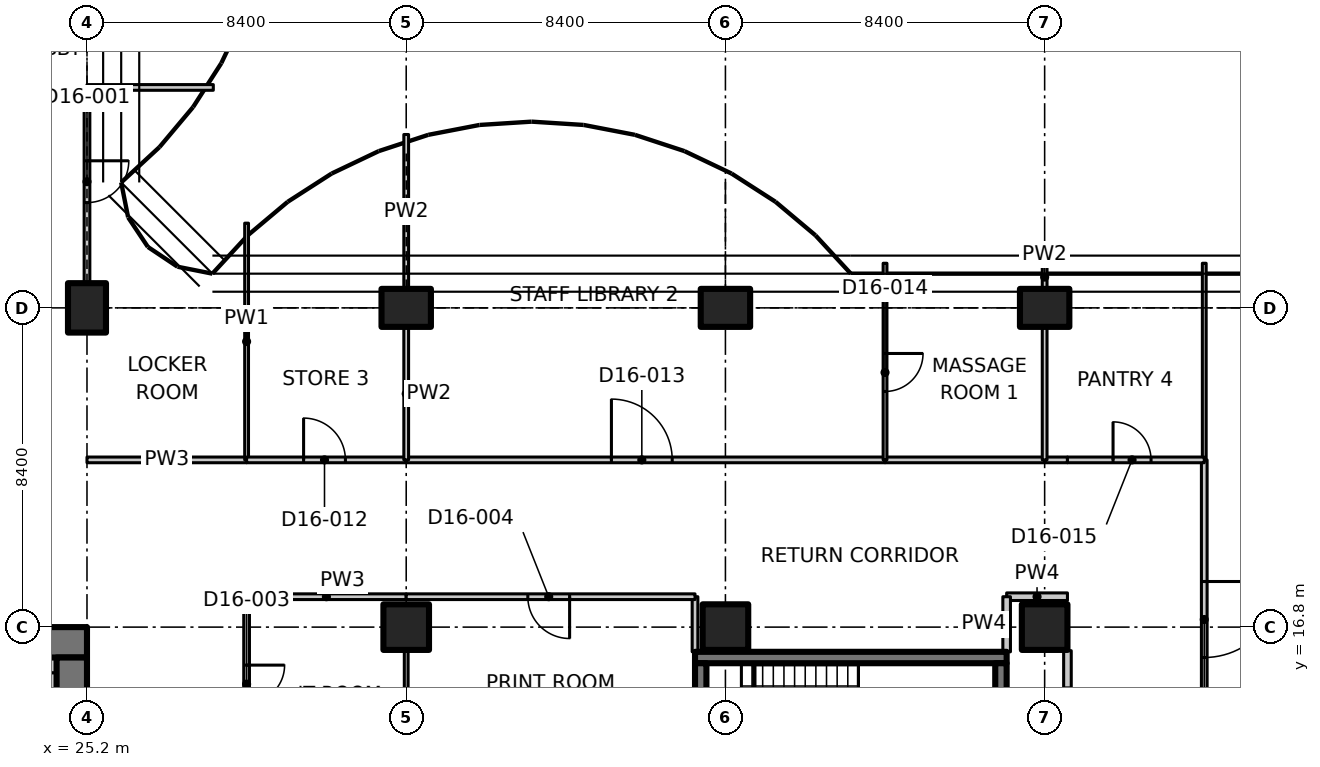
"""IFC4 building model, lengths in metres.
Left out: names, types, materials, properties, quantities, classifications, styles, units other than length and angle.
Written with IfcOpenShell. Run it as: python <this file> out.ifc"""

import sys

from ifc_helpers import new_model, si_unit, direction, frame, frame_2d, origin, origin_2d, place, context, subcontext, project, spatial, polyline, rectangle, outline, extrude, element, fill, save


model = new_model("IFC4")
c1 = context("Model", 3, precision=1e-05, world=origin(), true_north=direction((0.0, 1.0)))
c2 = subcontext(c1, "Body", "Model", "MODEL_VIEW")
j1 = project(units=[si_unit("LENGTHUNIT", "METRE"), si_unit("PLANEANGLEUNIT", "RADIAN")], contexts=[c1])
p1 = place(None, origin())
s1 = spatial("IfcSite", under=j1, at=p1, CompositionType="ELEMENT")
p2 = place(p1, origin())
s2 = spatial("IfcBuilding", under=s1, at=p2, CompositionType="ELEMENT")
p3 = place(p2, frame((0.0, 0.0, 131.3)))
s3 = spatial("IfcBuildingStorey", under=s2, at=p3, CompositionType="ELEMENT", Elevation=131.3)
p4 = place(p3, frame((25.2, 25.2, 0.0), z_axis=(0.0, 0.0, 1.0), x_axis=(1.0, 0.0, 0.0)))
e1 = element("IfcColumn", 1, at=p4, inside=s3, PredefinedType="COLUMN", context=c2, shape_type="SweptSolid", body=[
    extrude(rectangle(XDim=1.0, YDim=1.3, at=origin_2d()), origin(), (0.0, 0.0, 1.0), 3.35),
])
p5 = place(p3, frame((33.6, 16.8, 0.0), z_axis=(0.0, 0.0, 1.0), x_axis=(1.0, 0.0, 0.0)))
e2 = element("IfcColumn", 2, at=p5, inside=s3, PredefinedType="COLUMN", context=c2, shape_type="SweptSolid", body=[
    extrude(rectangle(XDim=1.2, YDim=1.2, at=origin_2d()), origin(), (0.0, 0.0, 1.0), 3.35),
])
p6 = place(p3, frame((33.6, 25.2, 0.0), z_axis=(0.0, 0.0, 1.0), x_axis=(0.0, 1.0, 0.0)))
e3 = element("IfcColumn", 3, at=p6, inside=s3, PredefinedType="COLUMN", context=c2, shape_type="SweptSolid", body=[
    extrude(rectangle(XDim=1.0, YDim=1.3, at=origin_2d()), origin(), (0.0, 0.0, 1.0), 3.35),
])
p7 = place(p3, frame((42.0, 16.8, 0.0), z_axis=(0.0, 0.0, 1.0), x_axis=(1.0, 0.0, 0.0)))
e4 = element("IfcColumn", 4, at=p7, inside=s3, PredefinedType="COLUMN", context=c2, shape_type="SweptSolid", body=[
    extrude(rectangle(XDim=1.2, YDim=1.2, at=origin_2d()), origin(), (0.0, 0.0, 1.0), 3.35),
])
p8 = place(p3, frame((42.0, 25.2, 0.0), z_axis=(0.0, 0.0, 1.0), x_axis=(0.0, 1.0, 0.0)))
e5 = element("IfcColumn", 5, at=p8, inside=s3, PredefinedType="COLUMN", context=c2, shape_type="SweptSolid", body=[
    extrude(rectangle(XDim=1.0, YDim=1.3, at=origin_2d()), origin(), (0.0, 0.0, 1.0), 3.35),
])
p9 = place(p3, frame((50.4, 16.8, 0.0), z_axis=(0.0, 0.0, 1.0), x_axis=(1.0, 0.0, 0.0)))
e6 = element("IfcColumn", 6, at=p9, inside=s3, PredefinedType="COLUMN", context=c2, shape_type="SweptSolid", body=[
    extrude(rectangle(XDim=1.2, YDim=1.2, at=origin_2d()), origin(), (0.0, 0.0, 1.0), 3.35),
])
p10 = place(p3, frame((50.4, 25.2, 0.0), z_axis=(0.0, 0.0, 1.0), x_axis=(0.0, 1.0, 0.0)))
e7 = element("IfcColumn", 7, at=p10, inside=s3, PredefinedType="COLUMN", context=c2, shape_type="SweptSolid", body=[
    extrude(rectangle(XDim=1.0, YDim=1.3, at=origin_2d()), origin(), (0.0, 0.0, 1.0), 3.35),
])
p11 = place(p3, frame((23.8, 16.4, 0.0), z_axis=(0.0, 0.0, 1.0), x_axis=(1.0, 0.0, 0.0)))
e8 = element("IfcWall", 8, at=p11, inside=s3, PredefinedType="SHEAR", context=c2, shape_type="SweptSolid", body=[
    extrude(rectangle(XDim=1.4, YDim=0.8, at=frame_2d((0.7, 0.0))), origin(), (0.0, 0.0, 1.0), 3.35),
])
p12 = place(p3, frame((24.8, 12.6, 0.0), z_axis=(0.0, 0.0, 1.0), x_axis=(0.0, 1.0, 0.0)))
e9 = element("IfcWall", 9, at=p12, inside=s3, PredefinedType="SHEAR", context=c2, shape_type="SweptSolid", body=[
    extrude(rectangle(XDim=3.4, YDim=0.8, at=frame_2d((1.7, 0.0))), origin(), (0.0, 0.0, 1.0), 3.35),
])
p13 = place(p3, frame((24.2, 12.6, 0.0), z_axis=(0.0, 0.0, 1.0), x_axis=(0.0, 1.0, 0.0)))
e10 = element("IfcWall", 10, at=p13, inside=s3, PredefinedType="PARTITIONING", context=c2, shape_type="SweptSolid", body=[
    extrude(rectangle(XDim=3.0, YDim=0.4, at=frame_2d((1.5, 0.0))), origin(), (0.0, 0.0, 1.0), 3.35),
])
p14 = place(p3, frame((23.8, 15.8, 0.0), z_axis=(0.0, 0.0, 1.0), x_axis=(1.0, 0.0, 0.0)))
e11 = element("IfcWall", 11, at=p14, inside=s3, PredefinedType="PARTITIONING", context=c2, shape_type="SweptSolid", body=[
    extrude(rectangle(XDim=0.6, YDim=0.4, at=frame_2d((0.3, 0.0))), origin(), (0.0, 0.0, 1.0), 3.35),
])
p15 = place(p3, frame((41.2, 16.0, 0.0), z_axis=(0.0, 0.0, 1.0), x_axis=(1.0, 0.0, 0.0)))
e12 = element("IfcWall", 12, at=p15, inside=s3, PredefinedType="SHEAR", context=c2, shape_type="SweptSolid", body=[
    extrude(rectangle(XDim=8.2, YDim=0.3, at=frame_2d((4.1, 0.0))), origin(), (0.0, 0.0, 1.0), 3.35),
])
for number, where, z_axis, x_axis in (
    (13, (41.35, 13.3, 0.0), (0.0, 0.0, 1.0), (0.0, 1.0, 0.0)),
    (14, (49.25, 13.3, 0.0), (0.0, 0.0, 1.0), (0.0, 1.0, 0.0)),
):
    element("IfcWall", number, at=place(p3, frame(where, z_axis=z_axis, x_axis=x_axis)), inside=s3, PredefinedType="SHEAR", context=c2, shape_type="SweptSolid", body=[
        extrude(rectangle(XDim=2.55, YDim=0.3, at=frame_2d((1.275, 0.0))), origin(), (0.0, 0.0, 1.0), 3.35),
    ])
p16 = place(p3, frame((25.2, 21.2, 0.0), z_axis=(0.0, 0.0, 1.0), x_axis=(1.0, 0.0, 0.0)))
e15 = element("IfcWall", 15, at=p16, inside=s3, PredefinedType="PARTITIONING", context=c2, shape_type="SweptSolid", body=[
    extrude(rectangle(XDim=4.2, YDim=0.15, at=frame_2d((2.1, 0.0))), origin(), (0.0, 0.0, 1.0), 3.33),
])
p17 = place(p3, frame((29.4, 17.6, 0.0), z_axis=(0.0, 0.0, 1.0), x_axis=(0.0, -1.0, 0.0)))
e16 = element("IfcWall", 16, at=p17, inside=s3, PredefinedType="PARTITIONING", context=c2, shape_type="SweptSolid", body=[
    extrude(rectangle(XDim=4.6, YDim=0.15, at=frame_2d((2.3, 0.0))), origin(), (0.0, 0.0, 1.0), 3.33),
])
p18 = place(p17, frame((1.8, 0.0, 0.0)))
e17 = element("IfcOpeningElement", 17, at=p18, cuts=e16, PredefinedType="OPENING", context=c2, shape_type="SweptSolid", body=[
    extrude(rectangle(XDim=1.0, YDim=2.1, at=frame_2d((0.5, 1.05))), frame((0.0, 0.085, 0.0), z_axis=(0.0, -1.0, 0.0), x_axis=(1.0, 0.0, 0.0)), (0.0, 0.0, 1.0), 0.17),
])
p19 = place(p3, frame((29.4, 27.429, 0.0), z_axis=(0.0, 0.0, 1.0), x_axis=(0.0, -1.0, 0.0)))
e18 = element("IfcWall", 18, at=p19, inside=s3, PredefinedType="PARTITIONING", context=c2, shape_type="SweptSolid", body=[
    extrude(outline(polyline([(0.0, 0.0), (6.229, 0.0), (6.229, 3.33), (2.679, 3.33), (2.677, 2.98), (1.781, 2.98), (1.779, 3.33), (0.154, 3.33), (0.0, 3.33), (0.0, 0.0)])), frame((0.0, 0.05, 0.0), z_axis=(0.0, -1.0, 0.0), x_axis=(1.0, 0.0, 0.0)), (0.0, 0.0, 1.0), 0.1),
])
p20 = place(p3, frame((25.2, 31.0, 0.0), z_axis=(0.0, 0.0, 1.0), x_axis=(0.0, -1.0, 0.0)))
e19 = element("IfcWall", 19, at=p20, inside=s3, PredefinedType="PARTITIONING", context=c2, shape_type="SweptSolid", body=[
    extrude(outline(polyline([(0.0, 0.0), (5.13, 0.0), (5.13, 2.98), (0.0, 2.98), (0.0, 0.0)])), frame((0.0, 0.075, 0.0), z_axis=(0.0, -1.0, 0.0), x_axis=(1.0, 0.0, 0.0)), (0.0, 0.0, 1.0), 0.15),
])
p21 = place(p20, frame((1.93, 0.0, 0.0)))
e20 = element("IfcOpeningElement", 20, at=p21, cuts=e19, PredefinedType="OPENING", context=c2, shape_type="SweptSolid", body=[
    extrude(rectangle(XDim=1.1, YDim=2.1, at=frame_2d((0.55, 1.05))), frame((0.0, 0.085, 0.0), z_axis=(0.0, -1.0, 0.0), x_axis=(1.0, 0.0, 0.0)), (0.0, 0.0, 1.0), 0.17),
])
p22 = place(p3, frame((25.2, 31.0, 0.0), z_axis=(0.0, 0.0, 1.0), x_axis=(1.0, 0.0, 0.0)))
e21 = element("IfcWall", 21, at=p22, inside=s3, PredefinedType="PARTITIONING", context=c2, shape_type="SweptSolid", body=[
    extrude(rectangle(XDim=3.324, YDim=0.15, at=frame_2d((1.662, 0.0))), origin(), (0.0, 0.0, 1.0), 2.98),
])
p23 = place(p3, frame((54.6, 21.2, 0.0), z_axis=(0.0, 0.0, 1.0), x_axis=(0.0, -1.0, 0.0)))
e22 = element("IfcWall", 22, at=p23, inside=s3, PredefinedType="PARTITIONING", context=c2, shape_type="SweptSolid", body=[
    extrude(rectangle(XDim=8.2, YDim=0.15, at=frame_2d((4.1, 0.0))), origin(), (0.0, 0.0, 1.0), 3.33),
])
p24 = place(p23, frame((3.2, 0.0, 0.0)))
e23 = element("IfcOpeningElement", 23, at=p24, cuts=e22, PredefinedType="OPENING", context=c2, shape_type="SweptSolid", body=[
    extrude(rectangle(XDim=2.0, YDim=2.4, at=frame_2d((1.0, 1.2))), frame((0.0, 0.085, 0.0), z_axis=(0.0, -1.0, 0.0), x_axis=(1.0, 0.0, 0.0)), (0.0, 0.0, 1.0), 0.17),
])
p25 = place(p3, frame((54.6, 21.2, 0.0), z_axis=(0.0, 0.0, 1.0), x_axis=(0.0, 1.0, 0.0)))
e24 = element("IfcWall", 24, at=p25, inside=s3, PredefinedType="PARTITIONING", context=c2, shape_type="SweptSolid", body=[
    extrude(outline(polyline([(0.0, 0.0), (5.174, 0.0), (5.174, 3.33), (5.1, 3.33), (4.45, 3.33), (4.448, 2.98), (3.552, 2.98), (3.55, 3.33), (0.0, 3.33), (0.0, 0.0)])), frame((0.0, 0.05, 0.0), z_axis=(0.0, -1.0, 0.0), x_axis=(1.0, 0.0, 0.0)), (0.0, 0.0, 1.0), 0.1),
])
p26 = place(p3, frame((33.6, 17.6, 0.0), z_axis=(0.0, 0.0, 1.0), x_axis=(-1.0, 0.0, 0.0)))
e25 = element("IfcWall", 25, at=p26, inside=s3, PredefinedType="PARTITIONING", context=c2, shape_type="SweptSolid", body=[
    extrude(rectangle(XDim=4.2, YDim=0.15, at=frame_2d((2.1, 0.0))), origin(), (0.0, 0.0, 1.0), 3.33),
])
p27 = place(p3, frame((41.2, 16.15, 0.0), z_axis=(0.0, 0.0, 1.0), x_axis=(0.0, 1.0, 0.0)))
e26 = element("IfcWall", 26, at=p27, inside=s3, PredefinedType="PARTITIONING", context=c2, shape_type="SweptSolid", body=[
    extrude(rectangle(XDim=1.45, YDim=0.15, at=frame_2d((0.725, 0.0))), origin(), (0.0, 0.0, 1.0), 3.33),
])
p28 = place(p3, frame((41.2, 17.6, 0.0), z_axis=(0.0, 0.0, 1.0), x_axis=(-1.0, 0.0, 0.0)))
e27 = element("IfcWall", 27, at=p28, inside=s3, PredefinedType="PARTITIONING", context=c2, shape_type="SweptSolid", body=[
    extrude(rectangle(XDim=7.6, YDim=0.15, at=frame_2d((3.8, 0.0))), origin(), (0.0, 0.0, 1.0), 3.33),
])
p29 = place(p28, frame((3.3, 0.0, 0.0)))
e28 = element("IfcOpeningElement", 28, at=p29, cuts=e27, PredefinedType="OPENING", context=c2, shape_type="SweptSolid", body=[
    extrude(rectangle(XDim=1.1, YDim=2.1, at=frame_2d((0.55, 1.05))), frame((0.0, 0.085, 0.0), z_axis=(0.0, -1.0, 0.0), x_axis=(1.0, 0.0, 0.0)), (0.0, 0.0, 1.0), 0.17),
])
p30 = place(p3, frame((51.0, 17.6, 0.0), z_axis=(0.0, 0.0, 1.0), x_axis=(-1.0, 0.0, 0.0)))
e29 = element("IfcWall", 29, at=p30, inside=s3, PredefinedType="PARTITIONING", context=c2, shape_type="SweptSolid", body=[
    extrude(rectangle(XDim=1.6, YDim=0.2, at=frame_2d((0.8, 0.0))), origin(), (0.0, 0.0, 1.0), 3.33),
])
p31 = place(p3, frame((49.4, 17.6, 0.0), z_axis=(0.0, 0.0, 1.0), x_axis=(0.0, -1.0, 0.0)))
e30 = element("IfcWall", 30, at=p31, inside=s3, PredefinedType="PARTITIONING", context=c2, shape_type="SweptSolid", body=[
    extrude(rectangle(XDim=1.45, YDim=0.2, at=frame_2d((0.725, 0.0))), origin(), (0.0, 0.0, 1.0), 3.33),
])
p32 = place(p3, frame((29.4, 21.2, 0.0), z_axis=(0.0, 0.0, 1.0), x_axis=(1.0, 0.0, 0.0)))
e31 = element("IfcWall", 31, at=p32, inside=s3, PredefinedType="PARTITIONING", context=c2, shape_type="SweptSolid", body=[
    extrude(rectangle(XDim=4.2, YDim=0.15, at=frame_2d((2.1, 0.0))), origin(), (0.0, 0.0, 1.0), 3.33),
])
p33 = place(p32, frame((1.5, 0.0, 0.0)))
e32 = element("IfcOpeningElement", 32, at=p33, cuts=e31, PredefinedType="OPENING", context=c2, shape_type="SweptSolid", body=[
    extrude(rectangle(XDim=1.1, YDim=2.1, at=frame_2d((0.55, 1.05))), frame((0.0, 0.085, 0.0), z_axis=(0.0, -1.0, 0.0), x_axis=(1.0, 0.0, 0.0)), (0.0, 0.0, 1.0), 0.17),
])
p34 = place(p3, frame((33.6, 21.2, 0.0), z_axis=(0.0, 0.0, 1.0), x_axis=(1.0, 0.0, 0.0)))
e33 = element("IfcWall", 33, at=p34, inside=s3, PredefinedType="PARTITIONING", context=c2, shape_type="SweptSolid", body=[
    extrude(rectangle(XDim=12.6, YDim=0.15, at=frame_2d((6.3, 0.0))), origin(), (0.0, 0.0, 1.0), 3.33),
])
p35 = place(p34, frame((5.4, 0.0, 0.0)))
e34 = element("IfcOpeningElement", 34, at=p35, cuts=e33, PredefinedType="OPENING", context=c2, shape_type="SweptSolid", body=[
    extrude(rectangle(XDim=1.6, YDim=2.1, at=frame_2d((0.8, 1.05))), frame((0.0, 0.085, 0.0), z_axis=(0.0, -1.0, 0.0), x_axis=(1.0, 0.0, 0.0)), (0.0, 0.0, 1.0), 0.17),
])
p36 = place(p3, frame((46.2, 21.2, 0.0), z_axis=(0.0, 0.0, 1.0), x_axis=(1.0, 0.0, 0.0)))
e35 = element("IfcWall", 35, at=p36, inside=s3, PredefinedType="PARTITIONING", context=c2, shape_type="SweptSolid", body=[
    extrude(rectangle(XDim=4.2, YDim=0.15, at=frame_2d((2.1, 0.0))), origin(), (0.0, 0.0, 1.0), 3.33),
])
p37 = place(p3, frame((50.4, 21.2, 0.0), z_axis=(0.0, 0.0, 1.0), x_axis=(1.0, 0.0, 0.0)))
e36 = element("IfcWall", 36, at=p37, inside=s3, PredefinedType="PARTITIONING", context=c2, shape_type="SweptSolid", body=[
    extrude(rectangle(XDim=0.6, YDim=0.15, at=frame_2d((0.3, 0.0))), origin(), (0.0, 0.0, 1.0), 3.33),
])
p38 = place(p3, frame((51.0, 13.0, 0.0), z_axis=(0.0, 0.0, 1.0), x_axis=(0.0, 1.0, 0.0)))
e37 = element("IfcWall", 37, at=p38, inside=s3, PredefinedType="PARTITIONING", context=c2, shape_type="SweptSolid", body=[
    extrude(rectangle(XDim=3.18, YDim=0.2, at=frame_2d((1.59, 0.0))), origin(), (0.0, 0.0, 1.0), 3.33),
])
p39 = place(p38, frame((1.2, 0.0, 0.0)))
e38 = element("IfcOpeningElement", 38, at=p39, cuts=e37, PredefinedType="OPENING", context=c2, shape_type="SweptSolid", body=[
    extrude(rectangle(XDim=1.0, YDim=2.1, at=frame_2d((0.5, 1.05))), frame((0.0, 0.11, 0.0), z_axis=(0.0, -1.0, 0.0), x_axis=(1.0, 0.0, 0.0)), (0.0, 0.0, 1.0), 0.22),
])
p40 = place(p3, frame((51.0, 21.2, 0.0), z_axis=(0.0, 0.0, 1.0), x_axis=(1.0, 0.0, 0.0)))
e39 = element("IfcWall", 39, at=p40, inside=s3, PredefinedType="PARTITIONING", context=c2, shape_type="SweptSolid", body=[
    extrude(rectangle(XDim=3.6, YDim=0.15, at=frame_2d((1.8, 0.0))), origin(), (0.0, 0.0, 1.0), 3.33),
])
p41 = place(p40, frame((1.2, 0.0, 0.0)))
e40 = element("IfcOpeningElement", 40, at=p41, cuts=e39, PredefinedType="OPENING", context=c2, shape_type="SweptSolid", body=[
    extrude(rectangle(XDim=1.0, YDim=2.1, at=frame_2d((0.5, 1.05))), frame((0.0, 0.085, 0.0), z_axis=(0.0, -1.0, 0.0), x_axis=(1.0, 0.0, 0.0)), (0.0, 0.0, 1.0), 0.17),
])
p42 = place(p3, frame((33.6, 16.18, 0.0), z_axis=(0.0, 0.0, 1.0), x_axis=(0.0, -1.0, 0.0)))
e41 = element("IfcWall", 41, at=p42, inside=s3, PredefinedType="PARTITIONING", context=c2, shape_type="SweptSolid", body=[
    extrude(rectangle(XDim=3.18, YDim=0.1, at=frame_2d((1.59, 0.0))), origin(), (0.0, 0.0, 1.0), 3.33),
])
p43 = place(p3, frame((33.6, 29.762, 0.0), z_axis=(0.0, 0.0, 1.0), x_axis=(0.0, -1.0, 0.0)))
e42 = element("IfcWall", 42, at=p43, inside=s3, PredefinedType="PARTITIONING", context=c2, shape_type="SweptSolid", body=[
    extrude(rectangle(XDim=4.042, YDim=0.125, at=frame_2d((2.021, 0.0))), origin(), (0.0, 0.0, 1.0), 2.98),
])
p44 = place(p3, frame((33.6, 24.68, 0.0), z_axis=(0.0, 0.0, 1.0), x_axis=(0.0, -1.0, 0.0)))
e43 = element("IfcWall", 43, at=p44, inside=s3, PredefinedType="PARTITIONING", context=c2, shape_type="SweptSolid", body=[
    extrude(rectangle(XDim=3.48, YDim=0.125, at=frame_2d((1.74, 0.0))), origin(), (0.0, 0.0, 1.0), 3.33),
])
p45 = place(p3, frame((46.2, 26.374, 0.0), z_axis=(0.0, 0.0, 1.0), x_axis=(0.0, -1.0, 0.0)))
e44 = element("IfcWall", 44, at=p45, inside=s3, PredefinedType="PARTITIONING", context=c2, shape_type="SweptSolid", body=[
    extrude(outline(polyline([(0.0, 0.0), (5.174, 0.0), (5.174, 3.33), (1.624, 3.33), (1.622, 2.98), (0.726, 2.98), (0.724, 3.33), (0.074, 3.33), (0.0, 3.33), (0.0, 0.0)])), frame((0.0, 0.05, 0.0), z_axis=(0.0, -1.0, 0.0), x_axis=(1.0, 0.0, 0.0)), (0.0, 0.0, 1.0), 0.1),
])
p46 = place(p45, frame((2.374, 0.0, 0.0)))
e45 = element("IfcOpeningElement", 45, at=p46, cuts=e44, PredefinedType="OPENING", context=c2, shape_type="SweptSolid", body=[
    extrude(rectangle(XDim=1.0, YDim=2.1, at=frame_2d((0.5, 1.05))), frame((0.0, 0.06, 0.0), z_axis=(0.0, -1.0, 0.0), x_axis=(1.0, 0.0, 0.0)), (0.0, 0.0, 1.0), 0.12),
])
p47 = place(p3, frame((50.4, 26.3, 0.0), z_axis=(0.0, 0.0, 1.0), x_axis=(0.0, -1.0, 0.0)))
e46 = element("IfcWall", 46, at=p47, inside=s3, PredefinedType="PARTITIONING", context=c2, shape_type="SweptSolid", body=[
    extrude(rectangle(XDim=0.58, YDim=0.125, at=frame_2d((0.29, 0.0))), origin(), (0.0, 0.0, 1.0), 3.33),
])
p48 = place(p3, frame((50.4, 24.68, 0.0), z_axis=(0.0, 0.0, 1.0), x_axis=(0.0, -1.0, 0.0)))
e47 = element("IfcWall", 47, at=p48, inside=s3, PredefinedType="PARTITIONING", context=c2, shape_type="SweptSolid", body=[
    extrude(rectangle(XDim=3.48, YDim=0.125, at=frame_2d((1.74, 0.0))), origin(), (0.0, 0.0, 1.0), 3.33),
])
p49 = place(p21, origin())
e48 = element("IfcDoor", 48, at=p49, inside=s3, OperationType="SINGLE_SWING_RIGHT", PredefinedType="DOOR", context=c2, shape_type="SweptSolid", body=[
    extrude(rectangle(XDim=1.1, YDim=2.1, at=frame_2d((0.55, 1.05))), frame((0.0, 0.025, 0.0), z_axis=(0.0, -1.0, 0.0), x_axis=(1.0, 0.0, 0.0)), (0.0, 0.0, 1.0), 0.05),
])
fill(e20, e48)
p50 = place(p24, origin())
e49 = element("IfcDoor", 49, at=p50, inside=s3, OperationType="DOUBLE_DOOR_SINGLE_SWING", PredefinedType="DOOR", context=c2, shape_type="SweptSolid", body=[
    extrude(rectangle(XDim=2.0, YDim=2.4, at=frame_2d((1.0, 1.2))), frame((0.0, 0.025, 0.0), z_axis=(0.0, -1.0, 0.0), x_axis=(1.0, 0.0, 0.0)), (0.0, 0.0, 1.0), 0.05),
])
fill(e23, e49)
p51 = place(p18, origin())
e50 = element("IfcDoor", 50, at=p51, inside=s3, OperationType="SINGLE_SWING_LEFT", PredefinedType="DOOR", context=c2, shape_type="SweptSolid", body=[
    extrude(rectangle(XDim=1.0, YDim=2.1, at=frame_2d((0.5, 1.05))), frame((0.0, 0.025, 0.0), z_axis=(0.0, -1.0, 0.0), x_axis=(1.0, 0.0, 0.0)), (0.0, 0.0, 1.0), 0.05),
])
fill(e17, e50)
p52 = place(p29, origin())
e51 = element("IfcDoor", 51, at=p52, inside=s3, OperationType="SINGLE_SWING_LEFT", PredefinedType="DOOR", context=c2, shape_type="SweptSolid", body=[
    extrude(rectangle(XDim=1.1, YDim=2.1, at=frame_2d((0.55, 1.05))), frame((0.0, 0.025, 0.0), z_axis=(0.0, -1.0, 0.0), x_axis=(1.0, 0.0, 0.0)), (0.0, 0.0, 1.0), 0.05),
])
fill(e28, e51)
p53 = place(p33, origin())
e52 = element("IfcDoor", 52, at=p53, inside=s3, OperationType="SINGLE_SWING_LEFT", PredefinedType="DOOR", context=c2, shape_type="SweptSolid", body=[
    extrude(rectangle(XDim=1.1, YDim=2.1, at=frame_2d((0.55, 1.05))), frame((0.0, 0.025, 0.0), z_axis=(0.0, -1.0, 0.0), x_axis=(1.0, 0.0, 0.0)), (0.0, 0.0, 1.0), 0.05),
])
fill(e32, e52)
p54 = place(p35, origin())
e53 = element("IfcDoor", 53, at=p54, inside=s3, OperationType="DOUBLE_DOOR_SINGLE_SWING", PredefinedType="DOOR", context=c2, shape_type="SweptSolid", body=[
    extrude(rectangle(XDim=1.6, YDim=2.1, at=frame_2d((0.8, 1.05))), frame((0.0, 0.025, 0.0), z_axis=(0.0, -1.0, 0.0), x_axis=(1.0, 0.0, 0.0)), (0.0, 0.0, 1.0), 0.05),
])
fill(e34, e53)
p55 = place(p46, origin())
e54 = element("IfcDoor", 54, at=p55, inside=s3, OperationType="SINGLE_SWING_LEFT", PredefinedType="DOOR", context=c2, shape_type="SweptSolid", body=[
    extrude(rectangle(XDim=1.0, YDim=2.1, at=frame_2d((0.5, 1.05))), frame((0.0, 0.025, 0.0), z_axis=(0.0, -1.0, 0.0), x_axis=(1.0, 0.0, 0.0)), (0.0, 0.0, 1.0), 0.05),
])
fill(e45, e54)
p56 = place(p41, origin())
e55 = element("IfcDoor", 55, at=p56, inside=s3, OperationType="SINGLE_SWING_LEFT", PredefinedType="DOOR", context=c2, shape_type="SweptSolid", body=[
    extrude(rectangle(XDim=1.0, YDim=2.1, at=frame_2d((0.5, 1.05))), frame((0.0, 0.025, 0.0), z_axis=(0.0, -1.0, 0.0), x_axis=(1.0, 0.0, 0.0)), (0.0, 0.0, 1.0), 0.05),
])
fill(e40, e55)
save(model, sys.argv[1])
